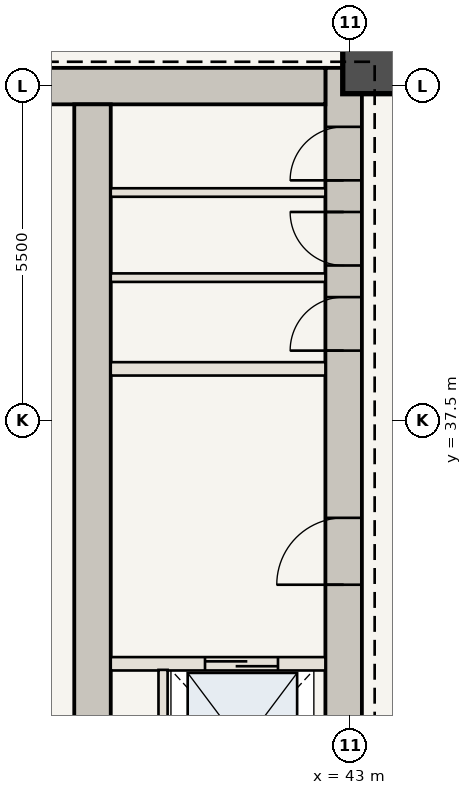
"""IFC4 building model, lengths in metres.
Left out: names, types, materials, properties, quantities, classifications, styles, units other than length and angle.
Written with IfcOpenShell. Run it as: python <this file> out.ifc"""

import sys

from ifc_helpers import new_model, si_unit, direction, frame, frame_2d, origin, origin_2d, place, context, subcontext, project, spatial, rectangle, extrude, element, fill, save


model = new_model("IFC4")
c1 = context("Model", 3, precision=1e-05, world=origin(), true_north=direction((0.0, 1.0)))
c2 = subcontext(c1, "Body", "Model", "MODEL_VIEW")
j1 = project(units=[si_unit("LENGTHUNIT", "METRE"), si_unit("PLANEANGLEUNIT", "RADIAN")], contexts=[c1])
p1 = place(None, origin())
s1 = spatial("IfcSite", under=j1, at=p1, CompositionType="ELEMENT")
p2 = place(p1, origin())
s2 = spatial("IfcBuilding", under=s1, at=p2, CompositionType="ELEMENT")
p3 = place(p2, frame((0.0, 0.0, 126.0)))
s3 = spatial("IfcBuildingStorey", under=s2, at=p3, CompositionType="ELEMENT", Elevation=126.0)
p4 = place(p3, frame((42.89, 30.6, 0.0), z_axis=(0.0, 0.0, 1.0), x_axis=(0.0, 1.0, 0.0)))
e1 = element("IfcWall", 1, at=p4, inside=s3, PredefinedType="SHEAR", context=c2, shape_type="SweptSolid", body=[
    extrude(rectangle(XDim=12.7, YDim=0.6, at=frame_2d((6.35, 0.0))), origin(), (0.0, 0.0, 1.0), 3.85),
])
p5 = place(p4, frame((4.2, 0.0, 0.0)))
e2 = element("IfcOpeningElement", 2, at=p5, cuts=e1, PredefinedType="OPENING", context=c2, shape_type="SweptSolid", body=[
    extrude(rectangle(XDim=1.1, YDim=2.15, at=frame_2d((0.55, 1.075))), frame((0.0, 0.31, 0.0), z_axis=(0.0, -1.0, 0.0), x_axis=(1.0, 0.0, 0.0)), (0.0, 0.0, 1.0), 0.62),
])
p6 = place(p4, frame((8.05, 0.0, 0.0)))
e3 = element("IfcOpeningElement", 3, at=p6, cuts=e1, PredefinedType="OPENING", context=c2, shape_type="SweptSolid", body=[
    extrude(rectangle(XDim=0.88, YDim=2.1, at=frame_2d((0.44, 1.05))), frame((0.0, 0.31, 0.0), z_axis=(0.0, -1.0, 0.0), x_axis=(1.0, 0.0, 0.0)), (0.0, 0.0, 1.0), 0.62),
])
p7 = place(p4, frame((9.45, 0.0, 0.0)))
e4 = element("IfcOpeningElement", 4, at=p7, cuts=e1, PredefinedType="OPENING", context=c2, shape_type="SweptSolid", body=[
    extrude(rectangle(XDim=0.88, YDim=2.1, at=frame_2d((0.44, 1.05))), frame((0.0, 0.31, 0.0), z_axis=(0.0, -1.0, 0.0), x_axis=(1.0, 0.0, 0.0)), (0.0, 0.0, 1.0), 0.62),
])
p8 = place(p4, frame((10.85, 0.0, 0.0)))
e5 = element("IfcOpeningElement", 5, at=p8, cuts=e1, PredefinedType="OPENING", context=c2, shape_type="SweptSolid", body=[
    extrude(rectangle(XDim=0.88, YDim=2.1, at=frame_2d((0.44, 1.05))), frame((0.0, 0.31, 0.0), z_axis=(0.0, -1.0, 0.0), x_axis=(1.0, 0.0, 0.0)), (0.0, 0.0, 1.0), 0.62),
])
p9 = place(p3, frame((37.75, 43.0, 0.0), z_axis=(0.0, 0.0, 1.0), x_axis=(1.0, 0.0, 0.0)))
e6 = element("IfcWall", 6, at=p9, inside=s3, PredefinedType="SHEAR", context=c2, shape_type="SweptSolid", body=[
    extrude(rectangle(XDim=4.84, YDim=0.6, at=frame_2d((2.42, 0.0))), origin(), (0.0, 0.0, 1.0), 3.85),
])
p10 = place(p3, frame((38.76, 30.6, 0.0), z_axis=(0.0, 0.0, 1.0), x_axis=(0.0, 1.0, 0.0)))
e7 = element("IfcWall", 7, at=p10, inside=s3, PredefinedType="SHEAR", context=c2, shape_type="SweptSolid", body=[
    extrude(rectangle(XDim=12.1, YDim=0.6, at=frame_2d((6.05, 0.0))), origin(), (0.0, 0.0, 1.0), 3.85),
])
p11 = place(p3, frame((43.35, 43.35, 0.0), z_axis=(0.0, 0.0, 1.0), x_axis=(1.0, 0.0, 0.0)))
e8 = element("IfcColumn", 8, at=p11, inside=s3, PredefinedType="COLUMN", context=c2, shape_type="SweptSolid", body=[
    extrude(rectangle(XDim=0.95, YDim=0.95, at=origin_2d()), origin(), (0.0, 0.0, 1.0), 3.85),
])
p12 = place(p3, frame((39.06, 33.5, 0.0), z_axis=(0.0, 0.0, 1.0), x_axis=(1.0, 0.0, 0.0)))
e9 = element("IfcWall", 9, at=p12, inside=s3, PredefinedType="STANDARD", context=c2, shape_type="SweptSolid", body=[
    extrude(rectangle(XDim=3.53, YDim=0.22, at=frame_2d((1.765, 0.0))), origin(), (0.0, 0.0, 1.0), 3.685),
])
p13 = place(p12, frame((1.55, 0.0, 0.0)))
e10 = element("IfcOpeningElement", 10, at=p13, cuts=e9, PredefinedType="OPENING", context=c2, shape_type="SweptSolid", body=[
    extrude(rectangle(XDim=1.2, YDim=2.2, at=frame_2d((0.6, 1.1))), frame((0.0, 0.12, 0.0), z_axis=(0.0, -1.0, 0.0), x_axis=(1.0, 0.0, 0.0)), (0.0, 0.0, 1.0), 0.24),
])
p14 = place(p3, frame((39.92, 30.75, 0.0), z_axis=(0.0, 0.0, 1.0), x_axis=(0.0, 1.0, 0.0)))
e11 = element("IfcWall", 11, at=p14, inside=s3, PredefinedType="STANDARD", context=c2, shape_type="SweptSolid", body=[
    extrude(rectangle(XDim=2.65, YDim=0.15, at=frame_2d((1.325, 0.0))), origin(), (0.0, 0.0, 1.0), 3.685),
])
p15 = place(p3, frame((39.06, 38.35, 0.0), z_axis=(0.0, 0.0, 1.0), x_axis=(1.0, 0.0, 0.0)))
e12 = element("IfcWall", 12, at=p15, inside=s3, PredefinedType="STANDARD", context=c2, shape_type="SweptSolid", body=[
    extrude(rectangle(XDim=3.53, YDim=0.22, at=frame_2d((1.765, 0.0))), origin(), (0.0, 0.0, 1.0), 3.685),
])
for number, where, z_axis, x_axis in (
    (13, (39.06, 39.85, 0.0), (0.0, 0.0, 1.0), (1.0, 0.0, 0.0)),
    (14, (39.06, 41.25, 0.0), (0.0, 0.0, 1.0), (1.0, 0.0, 0.0)),
):
    element("IfcWall", number, at=place(p3, frame(where, z_axis=z_axis, x_axis=x_axis)), inside=s3, PredefinedType="STANDARD", context=c2, shape_type="SweptSolid", body=[
        extrude(rectangle(XDim=3.53, YDim=0.14, at=frame_2d((1.765, 0.0))), origin(), (0.0, 0.0, 1.0), 3.685),
    ])
p16 = place(p5, origin())
e15 = element("IfcDoor", 15, at=p16, inside=s3, OperationType="SINGLE_SWING_LEFT", PredefinedType="DOOR", context=c2, shape_type="SweptSolid", body=[
    extrude(rectangle(XDim=1.1, YDim=2.15, at=frame_2d((0.55, 1.075))), frame((0.0, 0.025, 0.0), z_axis=(0.0, -1.0, 0.0), x_axis=(1.0, 0.0, 0.0)), (0.0, 0.0, 1.0), 0.05),
])
fill(e2, e15)
p17 = place(p6, origin())
e16 = element("IfcDoor", 16, at=p17, inside=s3, OperationType="SINGLE_SWING_LEFT", PredefinedType="DOOR", context=c2, shape_type="SweptSolid", body=[
    extrude(rectangle(XDim=0.88, YDim=2.1, at=frame_2d((0.44, 1.05))), frame((0.0, 0.025, 0.0), z_axis=(0.0, -1.0, 0.0), x_axis=(1.0, 0.0, 0.0)), (0.0, 0.0, 1.0), 0.05),
])
fill(e3, e16)
p18 = place(p7, origin())
e17 = element("IfcDoor", 17, at=p18, inside=s3, OperationType="SINGLE_SWING_RIGHT", PredefinedType="DOOR", context=c2, shape_type="SweptSolid", body=[
    extrude(rectangle(XDim=0.88, YDim=2.1, at=frame_2d((0.44, 1.05))), frame((0.0, 0.025, 0.0), z_axis=(0.0, -1.0, 0.0), x_axis=(1.0, 0.0, 0.0)), (0.0, 0.0, 1.0), 0.05),
])
fill(e4, e17)
p19 = place(p8, origin())
e18 = element("IfcDoor", 18, at=p19, inside=s3, OperationType="SINGLE_SWING_LEFT", PredefinedType="DOOR", context=c2, shape_type="SweptSolid", body=[
    extrude(rectangle(XDim=0.88, YDim=2.1, at=frame_2d((0.44, 1.05))), frame((0.0, 0.025, 0.0), z_axis=(0.0, -1.0, 0.0), x_axis=(1.0, 0.0, 0.0)), (0.0, 0.0, 1.0), 0.05),
])
fill(e5, e18)
p20 = place(p13, origin())
e19 = element("IfcDoor", 19, at=p20, inside=s3, OperationType="DOUBLE_DOOR_SLIDING", PredefinedType="DOOR", context=c2, shape_type="SweptSolid", body=[
    extrude(rectangle(XDim=1.2, YDim=2.2, at=frame_2d((0.6, 1.1))), frame((0.0, 0.025, 0.0), z_axis=(0.0, -1.0, 0.0), x_axis=(1.0, 0.0, 0.0)), (0.0, 0.0, 1.0), 0.05),
])
fill(e10, e19)
save(model, sys.argv[1])
